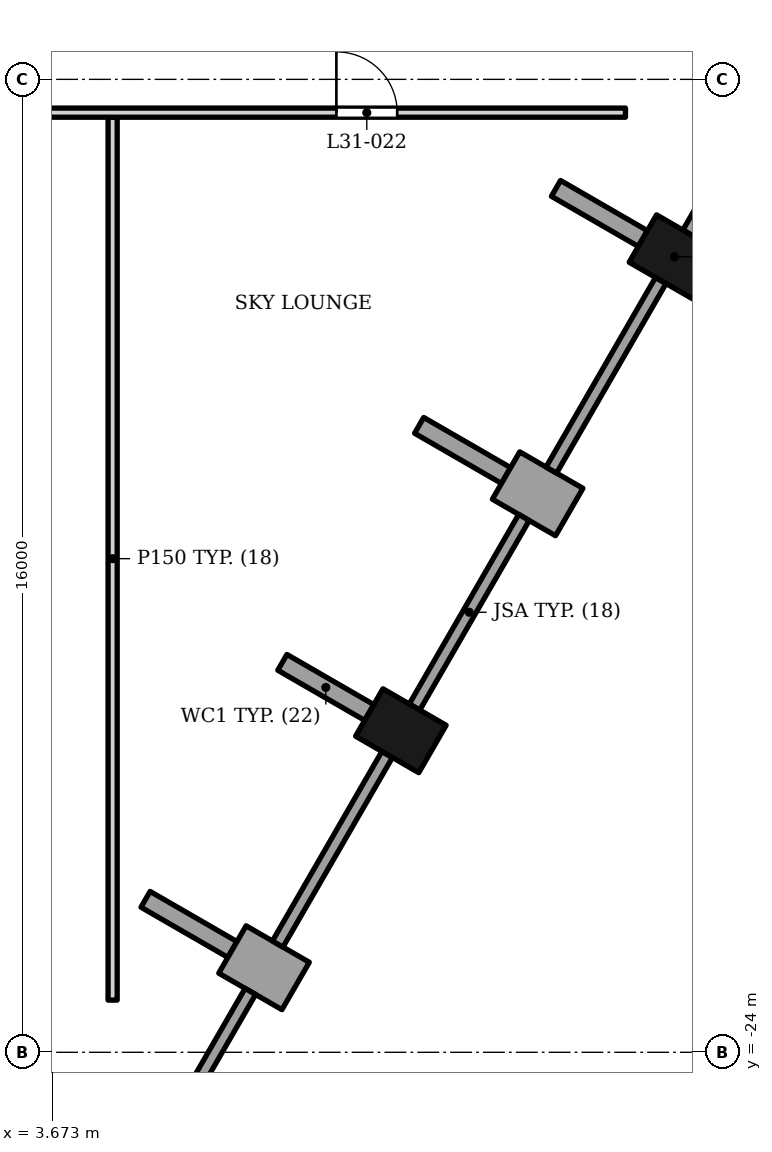
"""IFC4 building model, lengths in metres.
Left out: names, types, materials, properties, quantities, classifications, styles, units other than length and angle.
Written with IfcOpenShell. Run it as: python <this file> out.ifc"""

import sys

from ifc_helpers import new_model, si_unit, direction, frame, frame_2d, origin, origin_2d, place, context, subcontext, project, spatial, polyline, rectangle, outline, extrude, element, fill, save


model = new_model("IFC4")
c1 = context("Model", 3, precision=1e-05, world=origin(), true_north=direction((0.0, 1.0)))
c2 = subcontext(c1, "Body", "Model", "MODEL_VIEW")
j1 = project(units=[si_unit("LENGTHUNIT", "METRE"), si_unit("PLANEANGLEUNIT", "RADIAN")], contexts=[c1])
p1 = place(None, origin())
s1 = spatial("IfcSite", under=j1, at=p1, CompositionType="ELEMENT")
p2 = place(p1, origin())
s2 = spatial("IfcBuilding", under=s1, at=p2, CompositionType="ELEMENT")
p3 = place(p2, frame((0.0, 0.0, 132.6)))
s3 = spatial("IfcBuildingStorey", under=s2, at=p3, CompositionType="ELEMENT", Elevation=132.6)
for number, where, z_axis, x_axis in (
    (1, (9.407, -18.712, 0.0), (0.0, 0.0, 1.0), (0.5, 0.866, 0.0)),
    (2, (13.907, -10.918, 0.0), (0.0, 0.0, 1.0), (0.5, 0.866, 0.0)),
):
    element("IfcColumn", number, at=place(p3, frame(where, z_axis=z_axis, x_axis=x_axis)), inside=s3, PredefinedType="COLUMN", context=c2, shape_type="SweptSolid", body=[
        extrude(rectangle(XDim=0.9, YDim=1.2, at=origin_2d()), origin(), (0.0, 0.0, 1.0), 7.0),
    ])
p4 = place(p3, frame((7.676, -22.909, 0.0), z_axis=(0.0, 0.0, 1.0), x_axis=(-0.866094119867, 0.499880961361, 0.0)))
e3 = element("IfcWall", 3, at=p4, inside=s3, PredefinedType="SOLIDWALL", context=c2, shape_type="SweptSolid", body=[
    extrude(rectangle(XDim=1.2, YDim=0.9, at=frame_2d((0.6, 0.0))), origin(), (0.0, 0.0, 1.0), 6.0),
])
for number, where, z_axis, x_axis in (
    (4, (6.637, -22.309, 0.0), (0.0, 0.0, 1.0), (-0.866, 0.5, 0.0)),
    (5, (8.887, -18.412, 0.0), (0.0, 0.0, 1.0), (-0.866, 0.5, 0.0)),
):
    element("IfcWall", number, at=place(p3, frame(where, z_axis=z_axis, x_axis=x_axis)), inside=s3, PredefinedType="SOLIDWALL", context=c2, shape_type="SweptSolid", body=[
        extrude(rectangle(XDim=1.65, YDim=0.3, at=frame_2d((0.825, 0.0))), origin(), (0.0, 0.0, 1.0), 6.0),
    ])
p5 = place(p3, frame((12.176, -15.115, 0.0), z_axis=(0.0, 0.0, 1.0), x_axis=(-0.866094119867, 0.499880961361, 0.0)))
e6 = element("IfcWall", 6, at=p5, inside=s3, PredefinedType="SOLIDWALL", context=c2, shape_type="SweptSolid", body=[
    extrude(rectangle(XDim=1.2, YDim=0.9, at=frame_2d((0.6, 0.0))), origin(), (0.0, 0.0, 1.0), 6.0),
])
p6 = place(p3, frame((9.708, -13.69, 0.0), z_axis=(0.0, 0.0, 1.0), x_axis=(0.866040211805, -0.499974350878, 0.0)))
e7 = element("IfcWall", 7, at=p6, inside=s3, PredefinedType="SOLIDWALL", context=c2, shape_type="SweptSolid", body=[
    extrude(rectangle(XDim=1.65, YDim=0.3, at=frame_2d((0.825, 0.0))), origin(), (0.0, 0.0, 1.0), 6.0),
])
p7 = place(p3, frame((11.958, -9.793, 0.0), z_axis=(0.0, 0.0, 1.0), x_axis=(0.866040211805, -0.499974350878, 0.0)))
e8 = element("IfcWall", 8, at=p7, inside=s3, PredefinedType="SOLIDWALL", context=c2, shape_type="SweptSolid", body=[
    extrude(rectangle(XDim=1.65, YDim=0.3, at=frame_2d((0.825, 0.0))), origin(), (0.0, 0.0, 1.0), 5.778),
])
p8 = place(p3, origin())
e9 = element("IfcWall", 9, at=p8, inside=s3, PredefinedType="SOLIDWALL", context=c2, shape_type="SweptSolid", body=[
    extrude(outline(polyline([(6.845, -22.949), (5.045, -26.066), (5.219, -26.166), (7.018, -23.049), (6.845, -22.949)])), origin(), (0.0, 0.0, 1.0), 6.0),
])
for number, where, z_axis, x_axis in (
    (10, (7.382, -22.219, 0.0), (0.0, 0.0, 1.0), (0.5, 0.866, 0.0)),
    (11, (9.632, -18.323, 0.0), (0.0, 0.0, 1.0), (0.5, 0.866, 0.0)),
    (12, (11.882, -14.425, 0.0), (0.0, 0.0, 1.0), (0.5, 0.866, 0.0)),
    (13, (14.132, -10.528, 0.0), (0.0, 0.0, 1.0), (0.5, 0.866, 0.0)),
):
    element("IfcWall", number, at=place(p3, frame(where, z_axis=z_axis, x_axis=x_axis)), inside=s3, PredefinedType="SOLIDWALL", context=c2, shape_type="SweptSolid", body=[
        extrude(rectangle(XDim=3.6, YDim=0.2, at=frame_2d((1.8, 0.0))), origin(), (0.0, 0.0, 1.0), 6.0),
    ])
p9 = place(p3, frame((4.667, -23.142, 0.0), z_axis=(0.0, 0.0, 1.0), x_axis=(0.0, 1.0, 0.0)))
e14 = element("IfcWall", 14, at=p9, inside=s3, PredefinedType="PARTITIONING", context=c2, shape_type="SweptSolid", body=[
    extrude(rectangle(XDim=14.52, YDim=0.15, at=frame_2d((7.26, 0.0))), origin(), (0.0, 0.0, 1.0), 5.712),
])
p10 = place(p3, frame((-12.212, -8.547, 0.0), z_axis=(0.0, 0.0, 1.0), x_axis=(1.0, 0.0, 0.0)))
e15 = element("IfcWall", 15, at=p10, inside=s3, PredefinedType="PARTITIONING", context=c2, shape_type="SweptSolid", body=[
    extrude(rectangle(XDim=25.313, YDim=0.15, at=frame_2d((12.657, 0.0))), origin(), (0.0, 0.0, 1.0), 5.712),
])
p11 = place(p10, frame((20.559, 0.0, 0.0)))
e16 = element("IfcOpeningElement", 16, at=p11, cuts=e15, PredefinedType="OPENING", context=c2, shape_type="SweptSolid", body=[
    extrude(rectangle(XDim=1.0, YDim=2.1, at=frame_2d((0.5, 1.05))), frame((0.0, 0.085, 0.0), z_axis=(0.0, -1.0, 0.0), x_axis=(1.0, 0.0, 0.0)), (0.0, 0.0, 1.0), 0.17),
])
p12 = place(p10, frame((11.779, 0.0, 0.0)))
e17 = element("IfcOpeningElement", 17, at=p12, cuts=e15, PredefinedType="OPENING", context=c2, shape_type="SweptSolid", body=[
    extrude(rectangle(XDim=1.0, YDim=2.1, at=frame_2d((0.5, 1.05))), frame((0.0, 0.085, 0.0), z_axis=(0.0, -1.0, 0.0), x_axis=(1.0, 0.0, 0.0)), (0.0, 0.0, 1.0), 0.17),
])
p13 = place(p10, frame((3.196, 0.0, 0.0)))
e18 = element("IfcOpeningElement", 18, at=p13, cuts=e15, PredefinedType="OPENING", context=c2, shape_type="SweptSolid", body=[
    extrude(rectangle(XDim=1.0, YDim=2.1, at=frame_2d((0.5, 1.05))), frame((0.0, 0.085, 0.0), z_axis=(0.0, -1.0, 0.0), x_axis=(1.0, 0.0, 0.0)), (0.0, 0.0, 1.0), 0.17),
])
p14 = place(p11, origin())
e19 = element("IfcDoor", 19, at=p14, inside=s3, OperationType="SINGLE_SWING_LEFT", PredefinedType="DOOR", context=c2, shape_type="SweptSolid", body=[
    extrude(rectangle(XDim=1.0, YDim=2.1, at=frame_2d((0.5, 1.05))), frame((0.0, 0.025, 0.0), z_axis=(0.0, -1.0, 0.0), x_axis=(1.0, 0.0, 0.0)), (0.0, 0.0, 1.0), 0.05),
])
fill(e16, e19)
save(model, sys.argv[1])
